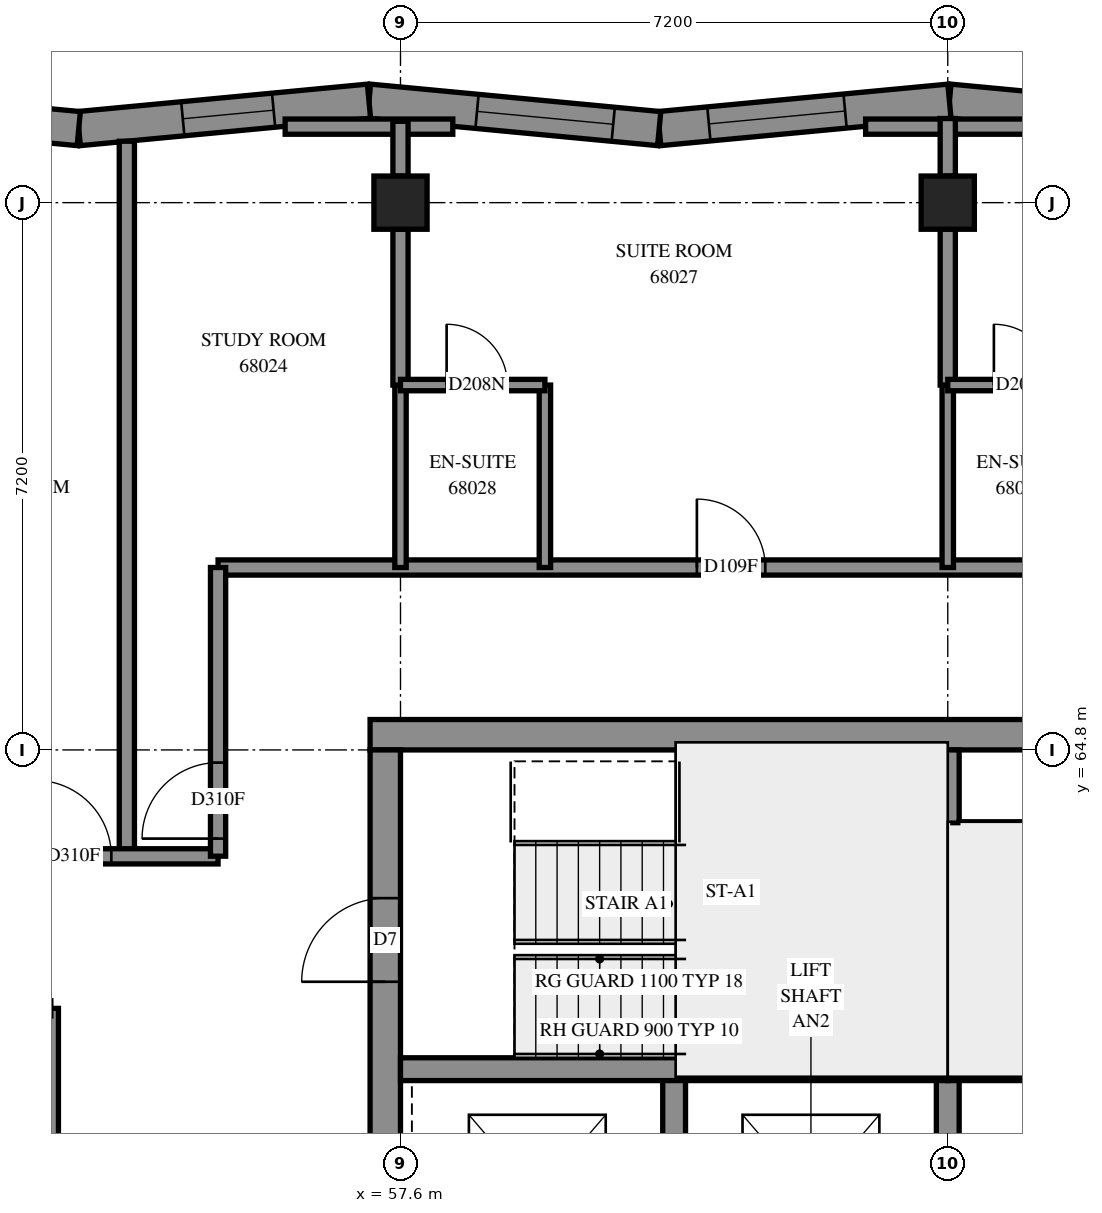
"""IFC4 building model, lengths in metres.
Left out: names, types, materials, properties, quantities, classifications, styles, units other than length and angle.
Written with IfcOpenShell. Run it as: python <this file> out.ifc"""

import sys

from ifc_helpers import new_model, si_unit, direction, frame, frame_2d, origin, origin_2d, place, context, subcontext, project, spatial, polyline, rectangle, outline, extrude, element, fill, save


model = new_model("IFC4")
c1 = context("Model", 3, precision=1e-05, world=origin(), true_north=direction((0.0, 1.0)))
c2 = subcontext(c1, "Body", "Model", "MODEL_VIEW")
j1 = project(units=[si_unit("LENGTHUNIT", "METRE"), si_unit("PLANEANGLEUNIT", "RADIAN")], contexts=[c1])
p1 = place(None, origin())
s1 = spatial("IfcSite", under=j1, at=p1, CompositionType="ELEMENT")
p2 = place(p1, origin())
s2 = spatial("IfcBuilding", under=s1, at=p2, CompositionType="ELEMENT")
p3 = place(p2, frame((0.0, 0.0, 250.6)))
s3 = spatial("IfcBuildingStorey", under=s2, at=p3, CompositionType="ELEMENT", Elevation=250.6)
for number, where, z_axis, x_axis in (
    (1, (57.6, 72.0, 0.0), (0.0, 0.0, 1.0), (1.0, 0.0, 0.0)),
    (2, (64.8, 72.0, 0.0), (0.0, 0.0, 1.0), (1.0, 0.0, 0.0)),
):
    element("IfcColumn", number, at=place(p3, frame(where, z_axis=z_axis, x_axis=x_axis)), inside=s3, PredefinedType="COLUMN", context=c2, shape_type="SweptSolid", body=[
        extrude(rectangle(XDim=0.7, YDim=0.7, at=origin_2d()), origin(), (0.0, 0.0, 1.0), 3.1),
    ])
p4 = place(p3, frame((57.2, 65.0, -0.3), z_axis=(0.0, 0.0, 1.0), x_axis=(1.0, 0.0, 0.0)))
e3 = element("IfcWall", 3, at=p4, inside=s3, PredefinedType="SHEAR", context=c2, shape_type="SweptSolid", body=[
    extrude(rectangle(XDim=15.2, YDim=0.4, at=frame_2d((7.6, 0.0))), origin(), (0.0, 0.0, 1.0), 2.7),
])
p5 = place(p4, frame((10.4, 0.0, 0.3)))
e4 = element("IfcOpeningElement", 4, at=p5, cuts=e3, PredefinedType="OPENING", context=c2, shape_type="SweptSolid", body=[
    extrude(rectangle(XDim=0.8, YDim=2.1, at=frame_2d((0.4, 1.05))), frame((0.0, 0.21, 0.0), z_axis=(0.0, -1.0, 0.0), x_axis=(1.0, 0.0, 0.0)), (0.0, 0.0, 1.0), 0.42),
])
p6 = place(p3, frame((57.4, 50.4, -0.3), z_axis=(0.0, 0.0, 1.0), x_axis=(0.0, 1.0, 0.0)))
e5 = element("IfcWall", 5, at=p6, inside=s3, PredefinedType="SHEAR", context=c2, shape_type="SweptSolid", body=[
    extrude(rectangle(XDim=14.4, YDim=0.4, at=frame_2d((7.2, 0.0))), origin(), (0.0, 0.0, 1.0), 2.7),
])
p7 = place(p6, frame((4.55, 0.0, 0.3)))
e6 = element("IfcOpeningElement", 6, at=p7, cuts=e5, PredefinedType="OPENING", context=c2, shape_type="SweptSolid", body=[
    extrude(rectangle(XDim=1.1, YDim=2.1, at=frame_2d((0.55, 1.05))), frame((0.0, 0.21, 0.0), z_axis=(0.0, -1.0, 0.0), x_axis=(1.0, 0.0, 0.0)), (0.0, 0.0, 1.0), 0.42),
])
p8 = place(p6, frame((11.35, 0.0, 0.3)))
e7 = element("IfcOpeningElement", 7, at=p8, cuts=e5, PredefinedType="OPENING", context=c2, shape_type="SweptSolid", body=[
    extrude(rectangle(XDim=1.1, YDim=2.1, at=frame_2d((0.55, 1.05))), frame((0.0, 0.21, 0.0), z_axis=(0.0, -1.0, 0.0), x_axis=(1.0, 0.0, 0.0)), (0.0, 0.0, 1.0), 0.42),
])
for number, where, z_axis, x_axis in (
    (8, (61.2, 57.3, 0.0), (0.0, 0.0, 1.0), (0.0, 1.0, 0.0)),
    (9, (64.8, 57.3, 0.0), (0.0, 0.0, 1.0), (0.0, 1.0, 0.0)),
):
    element("IfcWall", number, at=place(p3, frame(where, z_axis=z_axis, x_axis=x_axis)), inside=s3, PredefinedType="SOLIDWALL", context=c2, shape_type="SweptSolid", body=[
        extrude(rectangle(XDim=3.3, YDim=0.3, at=frame_2d((1.65, 0.0))), origin(), (0.0, 0.0, 1.0), 3.1),
    ])
for number, where, z_axis, x_axis in (
    (10, (57.6, 60.6, 0.0), (0.0, 0.0, 1.0), (1.0, 0.0, 0.0)),
    (11, (64.8, 60.6, 0.0), (0.0, 0.0, 1.0), (1.0, 0.0, 0.0)),
):
    element("IfcWall", number, at=place(p3, frame(where, z_axis=z_axis, x_axis=x_axis)), inside=s3, PredefinedType="SOLIDWALL", context=c2, shape_type="SweptSolid", body=[
        extrude(rectangle(XDim=7.2, YDim=0.3, at=frame_2d((3.6, 0.0))), origin(), (0.0, 0.0, 1.0), 3.1),
    ])
p9 = place(p3, frame((64.8, 60.6, 0.0), z_axis=(0.0, 0.0, 1.0), x_axis=(0.0, 1.0, 0.0)))
e12 = element("IfcWall", 12, at=p9, inside=s3, PredefinedType="SOLIDWALL", context=c2, shape_type="SweptSolid", body=[
    extrude(rectangle(XDim=4.2, YDim=0.3, at=frame_2d((2.1, 0.0))), origin(), (0.0, 0.0, 1.0), 3.1),
])
p10 = place(p3, frame((68.64, 72.974, 0.0), z_axis=(0.0, 0.0, 1.0), x_axis=(-0.9955603917, 0.0941249513, 0.0)))
e13 = element("IfcWall", 13, at=p10, inside=s3, PredefinedType="SOLIDWALL", context=c2, shape_type="SweptSolid", body=[
    extrude(outline(polyline([(0.021, -0.225), (3.857, -0.225), (3.814, 0.225), (-0.021, 0.225), (0.021, -0.225)])), origin(), (0.0, 0.0, 1.0), 3.1),
])
p11 = place(p10, frame((0.656, 0.0, 0.7)))
e14 = element("IfcOpeningElement", 14, at=p11, cuts=e13, PredefinedType="OPENING", context=c2, shape_type="SweptSolid", body=[
    extrude(rectangle(XDim=1.8, YDim=2.3, at=frame_2d((0.9, 1.15))), frame((0.0, 0.235, 0.0), z_axis=(0.0, -1.0, 0.0), x_axis=(1.0, 0.0, 0.0)), (0.0, 0.0, 1.0), 0.47),
])
p12 = place(p3, frame((64.822, 73.335, 0.0), z_axis=(0.0, 0.0, 1.0), x_axis=(-0.9955603917, -0.0941249513, 0.0)))
e15 = element("IfcWall", 15, at=p12, inside=s3, PredefinedType="SOLIDWALL", context=c2, shape_type="SweptSolid", body=[
    extrude(outline(polyline([(-0.021, -0.225), (3.814, -0.225), (3.857, 0.225), (0.021, 0.225), (-0.021, -0.225)])), origin(), (0.0, 0.0, 1.0), 3.1),
])
p13 = place(p12, frame((1.379, 0.0, 0.7)))
e16 = element("IfcOpeningElement", 16, at=p13, cuts=e15, PredefinedType="OPENING", context=c2, shape_type="SweptSolid", body=[
    extrude(rectangle(XDim=1.8, YDim=2.3, at=frame_2d((0.9, 1.15))), frame((0.0, 0.235, 0.0), z_axis=(0.0, -1.0, 0.0), x_axis=(1.0, 0.0, 0.0)), (0.0, 0.0, 1.0), 0.47),
])
p14 = place(p3, frame((61.004, 72.974, 0.0), z_axis=(0.0, 0.0, 1.0), x_axis=(-0.9955603917, 0.0941249513, 0.0)))
e17 = element("IfcWall", 17, at=p14, inside=s3, PredefinedType="SOLIDWALL", context=c2, shape_type="SweptSolid", body=[
    extrude(outline(polyline([(0.021, -0.225), (3.857, -0.225), (3.814, 0.225), (-0.021, 0.225), (0.021, -0.225)])), origin(), (0.0, 0.0, 1.0), 3.1),
])
p15 = place(p14, frame((0.608, 0.0, 0.7)))
e18 = element("IfcOpeningElement", 18, at=p15, cuts=e17, PredefinedType="OPENING", context=c2, shape_type="SweptSolid", body=[
    extrude(rectangle(XDim=1.8, YDim=2.3, at=frame_2d((0.9, 1.15))), frame((0.0, 0.235, 0.0), z_axis=(0.0, -1.0, 0.0), x_axis=(1.0, 0.0, 0.0)), (0.0, 0.0, 1.0), 0.47),
])
p16 = place(p3, frame((57.185, 73.335, 0.0), z_axis=(0.0, 0.0, 1.0), x_axis=(-0.9955603917, -0.0941249513, 0.0)))
e19 = element("IfcWall", 19, at=p16, inside=s3, PredefinedType="SOLIDWALL", context=c2, shape_type="SweptSolid", body=[
    extrude(outline(polyline([(-0.021, -0.225), (3.814, -0.225), (3.857, 0.225), (0.021, 0.225), (-0.021, -0.225)])), origin(), (0.0, 0.0, 1.0), 3.1),
])
p17 = place(p16, frame((1.26, 0.0, 0.45)))
e20 = element("IfcOpeningElement", 20, at=p17, cuts=e19, PredefinedType="OPENING", context=c2, shape_type="SweptSolid", body=[
    extrude(rectangle(XDim=1.2, YDim=2.55, at=frame_2d((0.6, 1.275))), frame((0.0, 0.235, 0.0), z_axis=(0.0, -1.0, 0.0), x_axis=(1.0, 0.0, 0.0)), (0.0, 0.0, 1.0), 0.47),
])
p18 = place(p3, frame((53.367, 72.974, 0.0), z_axis=(0.0, 0.0, 1.0), x_axis=(-0.9955603917, 0.0941249513, 0.0)))
e21 = element("IfcWall", 21, at=p18, inside=s3, PredefinedType="SOLIDWALL", context=c2, shape_type="SweptSolid", body=[
    extrude(outline(polyline([(0.021, -0.225), (3.857, -0.225), (3.814, 0.225), (-0.021, 0.225), (0.021, -0.225)])), origin(), (0.0, 0.0, 1.0), 3.1),
])
p19 = place(p18, frame((0.99, 0.0, 0.45)))
e22 = element("IfcOpeningElement", 22, at=p19, cuts=e21, PredefinedType="OPENING", context=c2, shape_type="SweptSolid", body=[
    extrude(rectangle(XDim=1.2, YDim=2.55, at=frame_2d((0.6, 1.275))), frame((0.0, 0.235, 0.0), z_axis=(0.0, -1.0, 0.0), x_axis=(1.0, 0.0, 0.0)), (0.0, 0.0, 1.0), 0.47),
])
p20 = place(p3, frame((64.95, 63.78, 0.0), z_axis=(0.0, 0.0, 1.0), x_axis=(1.0, 0.0, 0.0)))
e23 = element("IfcWall", 23, at=p20, inside=s3, PredefinedType="PARTITIONING", context=c2, shape_type="SweptSolid", body=[
    extrude(rectangle(XDim=5.95, YDim=0.15, at=frame_2d((2.975, 0.0))), origin(), (0.0, 0.0, 1.0), 3.1),
])
p21 = place(p3, frame((55.2, 67.2, 0.0), z_axis=(0.0, 0.0, 1.0), x_axis=(1.0, 0.0, 0.0)))
e24 = element("IfcWall", 24, at=p21, inside=s3, PredefinedType="PARTITIONING", context=c2, shape_type="SweptSolid", body=[
    extrude(rectangle(XDim=19.2, YDim=0.2, at=frame_2d((9.6, 0.0))), origin(), (0.0, 0.0, 1.0), 3.1),
])
p22 = place(p21, frame((6.299, 0.0, 0.0)))
e25 = element("IfcOpeningElement", 25, at=p22, cuts=e24, PredefinedType="OPENING", context=c2, shape_type="SweptSolid", body=[
    extrude(rectangle(XDim=0.9, YDim=2.1, at=frame_2d((0.45, 1.05))), frame((0.0, 0.11, 0.0), z_axis=(0.0, -1.0, 0.0), x_axis=(1.0, 0.0, 0.0)), (0.0, 0.0, 1.0), 0.22),
])
p23 = place(p21, frame((13.65, 0.0, 0.0)))
e26 = element("IfcOpeningElement", 26, at=p23, cuts=e24, PredefinedType="OPENING", context=c2, shape_type="SweptSolid", body=[
    extrude(rectangle(XDim=0.9, YDim=2.1, at=frame_2d((0.45, 1.05))), frame((0.0, 0.11, 0.0), z_axis=(0.0, -1.0, 0.0), x_axis=(1.0, 0.0, 0.0)), (0.0, 0.0, 1.0), 0.22),
])
p24 = place(p3, frame((54.0, 63.4, 0.0), z_axis=(0.0, 0.0, 1.0), x_axis=(0.0, 1.0, 0.0)))
e27 = element("IfcWall", 27, at=p24, inside=s3, PredefinedType="PARTITIONING", context=c2, shape_type="SweptSolid", body=[
    extrude(rectangle(XDim=9.408, YDim=0.2, at=frame_2d((4.704, 0.0))), origin(), (0.0, 0.0, 1.0), 3.1),
])
p25 = place(p3, frame((53.0, 56.202, 0.0), z_axis=(0.0, 0.0, 1.0), x_axis=(0.0, 1.0, 0.0)))
e28 = element("IfcWall", 28, at=p25, inside=s3, PredefinedType="PARTITIONING", context=c2, shape_type="SweptSolid", body=[
    extrude(rectangle(XDim=5.198, YDim=0.2, at=frame_2d((2.599, 0.0))), origin(), (0.0, 0.0, 1.0), 3.1),
])
p26 = place(p3, frame((50.85, 63.4, 0.0), z_axis=(0.0, 0.0, 1.0), x_axis=(1.0, 0.0, 0.0)))
e29 = element("IfcWall", 29, at=p26, inside=s3, PredefinedType="PARTITIONING", context=c2, shape_type="SweptSolid", body=[
    extrude(rectangle(XDim=4.35, YDim=0.2, at=frame_2d((2.175, 0.0))), origin(), (0.0, 0.0, 1.0), 3.1),
])
p27 = place(p26, frame((1.946, 0.0, 0.0)))
e30 = element("IfcOpeningElement", 30, at=p27, cuts=e29, PredefinedType="OPENING", context=c2, shape_type="SweptSolid", body=[
    extrude(rectangle(XDim=1.0, YDim=2.1, at=frame_2d((0.5, 1.05))), frame((0.0, 0.11, 0.0), z_axis=(0.0, -1.0, 0.0), x_axis=(1.0, 0.0, 0.0)), (0.0, 0.0, 1.0), 0.22),
])
p28 = place(p3, frame((55.2, 63.402, 0.0), z_axis=(0.0, 0.0, 1.0), x_axis=(0.0, 1.0, 0.0)))
e31 = element("IfcWall", 31, at=p28, inside=s3, PredefinedType="PARTITIONING", context=c2, shape_type="SweptSolid", body=[
    extrude(rectangle(XDim=3.798, YDim=0.2, at=frame_2d((1.899, 0.0))), origin(), (0.0, 0.0, 1.0), 3.1),
])
p29 = place(p28, frame((0.231, 0.0, 0.0)))
e32 = element("IfcOpeningElement", 32, at=p29, cuts=e31, PredefinedType="OPENING", context=c2, shape_type="SweptSolid", body=[
    extrude(rectangle(XDim=1.0, YDim=2.1, at=frame_2d((0.5, 1.05))), frame((0.0, 0.11, 0.0), z_axis=(0.0, -1.0, 0.0), x_axis=(1.0, 0.0, 0.0)), (0.0, 0.0, 1.0), 0.22),
])
for number, where, z_axis, x_axis in (
    (33, (59.5, 67.2, 0.0), (0.0, 0.0, 1.0), (0.0, 1.0, 0.0)),
    (34, (57.6, 67.2, 0.0), (0.0, 0.0, 1.0), (0.0, 1.0, 0.0)),
    (35, (64.8, 67.2, 0.0), (0.0, 0.0, 1.0), (0.0, 1.0, 0.0)),
):
    element("IfcWall", number, at=place(p3, frame(where, z_axis=z_axis, x_axis=x_axis)), inside=s3, PredefinedType="PARTITIONING", context=c2, shape_type="SweptSolid", body=[
        extrude(rectangle(XDim=2.4, YDim=0.15, at=frame_2d((1.2, 0.0))), origin(), (0.0, 0.0, 1.0), 3.1),
    ])
p30 = place(p3, frame((56.083, 73.0, 0.0), z_axis=(0.0, 0.0, 1.0), x_axis=(1.0, 0.0, 0.0)))
e36 = element("IfcWall", 36, at=p30, inside=s3, PredefinedType="PARTITIONING", context=c2, shape_type="SweptSolid", body=[
    extrude(rectangle(XDim=2.206, YDim=0.2, at=frame_2d((1.103, 0.0))), origin(), (0.0, 0.0, 1.0), 3.1),
])
p31 = place(p3, frame((63.719, 73.0, 0.0), z_axis=(0.0, 0.0, 1.0), x_axis=(1.0, 0.0, 0.0)))
e37 = element("IfcWall", 37, at=p31, inside=s3, PredefinedType="PARTITIONING", context=c2, shape_type="SweptSolid", body=[
    extrude(rectangle(XDim=2.206, YDim=0.2, at=frame_2d((1.103, 0.0))), origin(), (0.0, 0.0, 1.0), 3.1),
])
for number, where, z_axis, x_axis in (
    (38, (57.6, 69.6, 0.0), (0.0, 0.0, 1.0), (0.0, 1.0, 0.0)),
    (39, (64.8, 69.6, 0.0), (0.0, 0.0, 1.0), (0.0, 1.0, 0.0)),
):
    element("IfcWall", number, at=place(p3, frame(where, z_axis=z_axis, x_axis=x_axis)), inside=s3, PredefinedType="PARTITIONING", context=c2, shape_type="SweptSolid", body=[
        extrude(rectangle(XDim=2.05, YDim=0.2, at=frame_2d((1.025, 0.0))), origin(), (0.0, 0.0, 1.0), 3.1),
    ])
p32 = place(p3, frame((64.8, 69.6, 0.0), z_axis=(0.0, 0.0, 1.0), x_axis=(1.0, 0.0, 0.0)))
e40 = element("IfcWall", 40, at=p32, inside=s3, PredefinedType="PARTITIONING", context=c2, shape_type="SweptSolid", body=[
    extrude(rectangle(XDim=1.9, YDim=0.15, at=frame_2d((0.95, 0.0))), origin(), (0.0, 0.0, 1.0), 3.1),
])
p33 = place(p32, frame((0.607, 0.0, 0.0)))
e41 = element("IfcOpeningElement", 41, at=p33, cuts=e40, PredefinedType="OPENING", context=c2, shape_type="SweptSolid", body=[
    extrude(rectangle(XDim=0.8, YDim=2.1, at=frame_2d((0.4, 1.05))), frame((0.0, 0.085, 0.0), z_axis=(0.0, -1.0, 0.0), x_axis=(1.0, 0.0, 0.0)), (0.0, 0.0, 1.0), 0.17),
])
p34 = place(p3, frame((57.6, 69.6, 0.0), z_axis=(0.0, 0.0, 1.0), x_axis=(1.0, 0.0, 0.0)))
e42 = element("IfcWall", 42, at=p34, inside=s3, PredefinedType="PARTITIONING", context=c2, shape_type="SweptSolid", body=[
    extrude(rectangle(XDim=1.9, YDim=0.15, at=frame_2d((0.95, 0.0))), origin(), (0.0, 0.0, 1.0), 3.1),
])
p35 = place(p34, frame((0.607, 0.0, 0.0)))
e43 = element("IfcOpeningElement", 43, at=p35, cuts=e42, PredefinedType="OPENING", context=c2, shape_type="SweptSolid", body=[
    extrude(rectangle(XDim=0.8, YDim=2.1, at=frame_2d((0.4, 1.05))), frame((0.0, 0.085, 0.0), z_axis=(0.0, -1.0, 0.0), x_axis=(1.0, 0.0, 0.0)), (0.0, 0.0, 1.0), 0.17),
])
p36 = place(p3, frame((64.8, 72.35, 0.0), z_axis=(0.0, 0.0, 1.0), x_axis=(0.0, 1.0, 0.0)))
e44 = element("IfcWall", 44, at=p36, inside=s3, PredefinedType="PARTITIONING", context=c2, shape_type="SweptSolid", body=[
    extrude(rectangle(XDim=0.757, YDim=0.2, at=frame_2d((0.379, 0.0))), origin(), (0.0, 0.0, 1.0), 3.1),
])
p37 = place(p3, frame((57.6, 72.35, 0.0), z_axis=(0.0, 0.0, 1.0), x_axis=(0.0, 1.0, 0.0)))
e45 = element("IfcWall", 45, at=p37, inside=s3, PredefinedType="PARTITIONING", context=c2, shape_type="SweptSolid", body=[
    extrude(rectangle(XDim=0.72, YDim=0.2, at=frame_2d((0.36, 0.0))), origin(), (0.0, 0.0, 1.0), 3.1),
])
p38 = place(p17, origin())
e46 = element("IfcWindow", 46, at=p38, inside=s3, PartitioningType="SINGLE_PANEL", PredefinedType="WINDOW", context=c2, shape_type="SweptSolid", body=[
    extrude(rectangle(XDim=1.2, YDim=2.55, at=frame_2d((0.6, 1.275))), frame((0.0, 0.205, 0.0), z_axis=(0.0, -1.0, 0.0), x_axis=(1.0, 0.0, 0.0)), (0.0, 0.0, 1.0), 0.06),
])
fill(e20, e46)
p39 = place(p8, origin())
e47 = element("IfcDoor", 47, at=p39, inside=s3, OperationType="SINGLE_SWING_LEFT", PredefinedType="DOOR", context=c2, shape_type="SweptSolid", body=[
    extrude(rectangle(XDim=1.1, YDim=2.1, at=frame_2d((0.55, 1.05))), frame((0.0, 0.025, 0.0), z_axis=(0.0, -1.0, 0.0), x_axis=(1.0, 0.0, 0.0)), (0.0, 0.0, 1.0), 0.05),
])
fill(e7, e47)
p40 = place(p27, origin())
e48 = element("IfcDoor", 48, at=p40, inside=s3, OperationType="SINGLE_SWING_RIGHT", PredefinedType="DOOR", context=c2, shape_type="SweptSolid", body=[
    extrude(rectangle(XDim=1.0, YDim=2.1, at=frame_2d((0.5, 1.05))), frame((0.0, 0.025, 0.0), z_axis=(0.0, -1.0, 0.0), x_axis=(1.0, 0.0, 0.0)), (0.0, 0.0, 1.0), 0.05),
])
fill(e30, e48)
p41 = place(p29, origin())
e49 = element("IfcDoor", 49, at=p41, inside=s3, OperationType="SINGLE_SWING_LEFT", PredefinedType="DOOR", context=c2, shape_type="SweptSolid", body=[
    extrude(rectangle(XDim=1.0, YDim=2.1, at=frame_2d((0.5, 1.05))), frame((0.0, 0.025, 0.0), z_axis=(0.0, -1.0, 0.0), x_axis=(1.0, 0.0, 0.0)), (0.0, 0.0, 1.0), 0.05),
])
fill(e32, e49)
p42 = place(p22, origin())
e50 = element("IfcDoor", 50, at=p42, inside=s3, OperationType="SINGLE_SWING_RIGHT", PredefinedType="DOOR", context=c2, shape_type="SweptSolid", body=[
    extrude(rectangle(XDim=0.9, YDim=2.1, at=frame_2d((0.45, 1.05))), frame((0.0, 0.025, 0.0), z_axis=(0.0, -1.0, 0.0), x_axis=(1.0, 0.0, 0.0)), (0.0, 0.0, 1.0), 0.05),
])
fill(e25, e50)
p43 = place(p35, origin())
e51 = element("IfcDoor", 51, at=p43, inside=s3, OperationType="SINGLE_SWING_RIGHT", PredefinedType="DOOR", context=c2, shape_type="SweptSolid", body=[
    extrude(rectangle(XDim=0.8, YDim=2.1, at=frame_2d((0.4, 1.05))), frame((0.0, 0.025, 0.0), z_axis=(0.0, -1.0, 0.0), x_axis=(1.0, 0.0, 0.0)), (0.0, 0.0, 1.0), 0.05),
])
fill(e43, e51)
p44 = place(p33, origin())
e52 = element("IfcDoor", 52, at=p44, inside=s3, OperationType="SINGLE_SWING_RIGHT", PredefinedType="DOOR", context=c2, shape_type="SweptSolid", body=[
    extrude(rectangle(XDim=0.8, YDim=2.1, at=frame_2d((0.4, 1.05))), frame((0.0, 0.025, 0.0), z_axis=(0.0, -1.0, 0.0), x_axis=(1.0, 0.0, 0.0)), (0.0, 0.0, 1.0), 0.05),
])
fill(e41, e52)
p45 = place(p13, origin())
e53 = element("IfcWindow", 53, at=p45, inside=s3, PartitioningType="SINGLE_PANEL", PredefinedType="WINDOW", context=c2, shape_type="SweptSolid", body=[
    extrude(rectangle(XDim=1.8, YDim=2.3, at=frame_2d((0.9, 1.15))), frame((0.0, 0.205, 0.0), z_axis=(0.0, -1.0, 0.0), x_axis=(1.0, 0.0, 0.0)), (0.0, 0.0, 1.0), 0.06),
])
fill(e16, e53)
p46 = place(p15, origin())
e54 = element("IfcWindow", 54, at=p46, inside=s3, PartitioningType="SINGLE_PANEL", PredefinedType="WINDOW", context=c2, shape_type="SweptSolid", body=[
    extrude(rectangle(XDim=1.8, YDim=2.3, at=frame_2d((0.9, 1.15))), frame((0.0, 0.205, 0.0), z_axis=(0.0, -1.0, 0.0), x_axis=(1.0, 0.0, 0.0)), (0.0, 0.0, 1.0), 0.06),
])
fill(e18, e54)
save(model, sys.argv[1])
